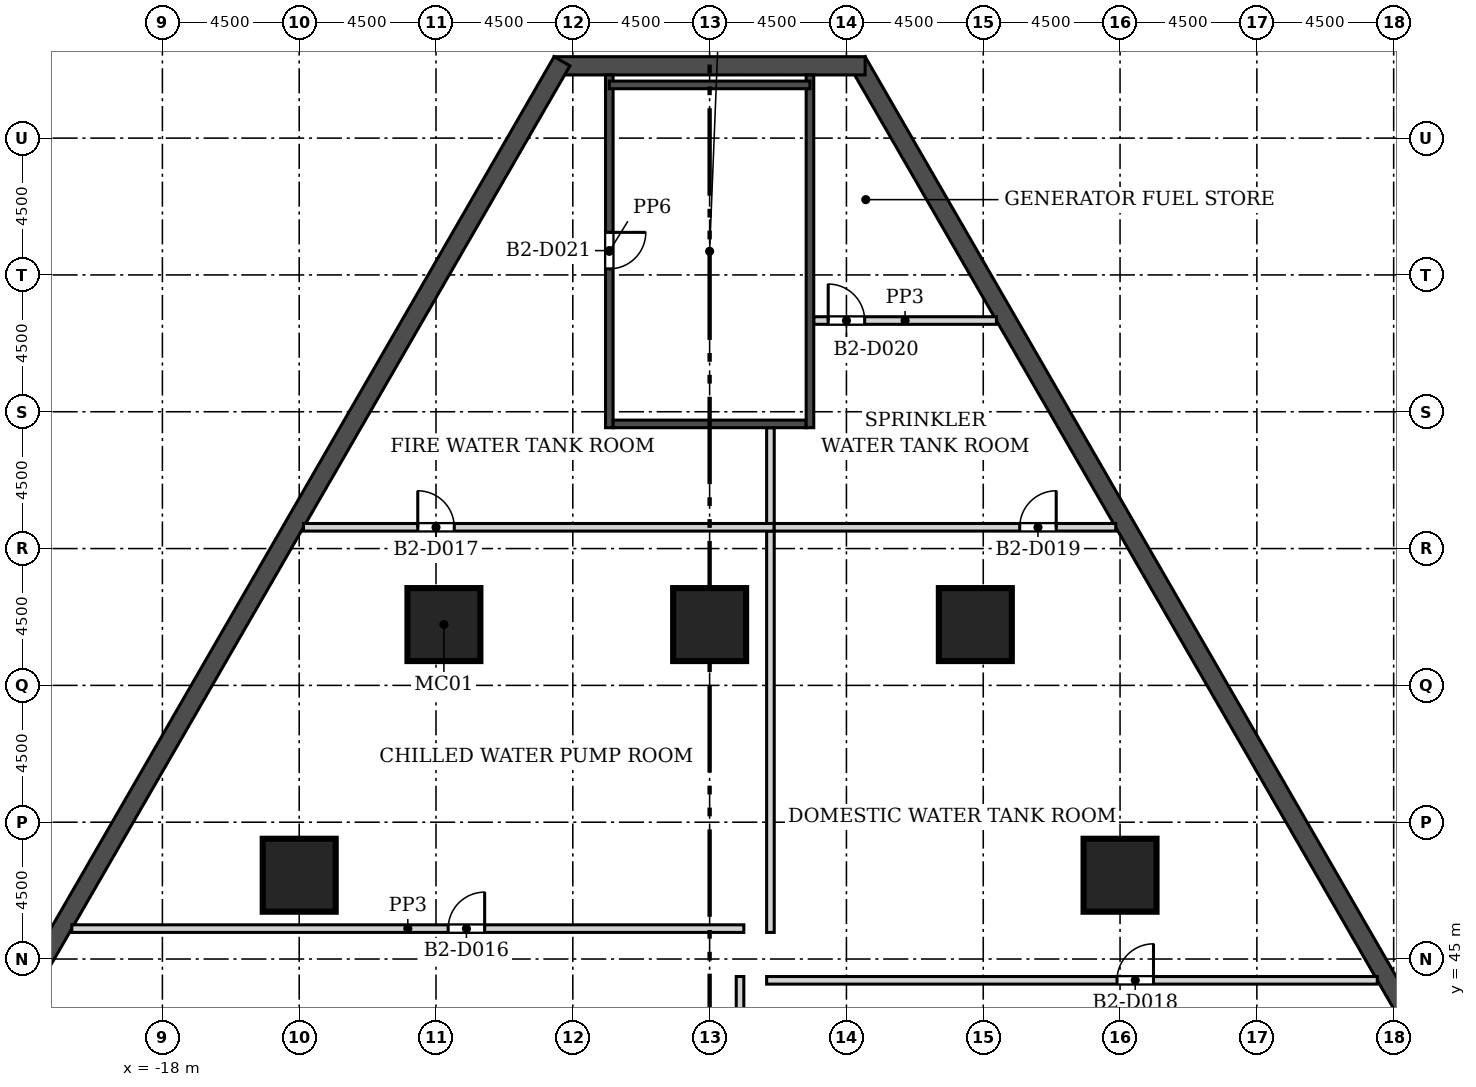
"""IFC4 building model, lengths in metres.
Left out: names, types, materials, properties, quantities, classifications, styles, units other than length and angle.
Written with IfcOpenShell. Run it as: python <this file> out.ifc"""

import sys

from ifc_helpers import new_model, si_unit, direction, frame, frame_2d, origin, origin_2d, place, context, subcontext, project, spatial, rectangle, extrude, element, fill, save


model = new_model("IFC4")
c1 = context("Model", 3, precision=1e-05, world=origin(), true_north=direction((0.0, 1.0)))
c2 = subcontext(c1, "Body", "Model", "MODEL_VIEW")
j1 = project(units=[si_unit("LENGTHUNIT", "METRE"), si_unit("PLANEANGLEUNIT", "RADIAN")], contexts=[c1])
p1 = place(None, origin())
s1 = spatial("IfcSite", under=j1, at=p1, CompositionType="ELEMENT")
p2 = place(p1, origin())
s2 = spatial("IfcBuilding", under=s1, at=p2, CompositionType="ELEMENT")
p3 = place(p2, frame((0.0, 0.0, -14.0)))
s3 = spatial("IfcBuildingStorey", under=s2, at=p3, CompositionType="ELEMENT", Elevation=-14.0)
p4 = place(p3, frame((42.971, 8.51, -0.4), z_axis=(0.0, 0.0, 1.0), x_axis=(-0.499999312333, 0.866025800809, 0.0)))
e1 = element("IfcWall", 1, at=p4, inside=s3, PredefinedType="SOLIDWALL", context=c2, shape_type="SweptSolid", body=[
    extrude(rectangle(XDim=76.231, YDim=0.6, at=frame_2d((38.115, 0.0))), origin(), (0.0, 0.0, 1.0), 6.4),
])
p5 = place(p3, frame((5.115, 74.378, -0.4), z_axis=(0.0, 0.0, 1.0), x_axis=(-1.0, 0.0, 0.0)))
e2 = element("IfcWall", 2, at=p5, inside=s3, PredefinedType="SOLIDWALL", context=c2, shape_type="SweptSolid", body=[
    extrude(rectangle(XDim=10.231, YDim=0.6, at=frame_2d((5.115, 0.0))), origin(), (0.0, 0.0, 1.0), 6.4),
])
p6 = place(p3, frame((-4.856, 74.528, -0.4), z_axis=(0.0, 0.0, 1.0), x_axis=(-0.499999312333, -0.866025800809, 0.0)))
e3 = element("IfcWall", 3, at=p6, inside=s3, PredefinedType="SOLIDWALL", context=c2, shape_type="SweptSolid", body=[
    extrude(rectangle(XDim=76.231, YDim=0.6, at=frame_2d((38.115, 0.0))), origin(), (0.0, 0.0, 1.0), 6.4),
])
for number, where, z_axis, x_axis in (
    (4, (-8.74, 56.0, 0.0), (0.0, 0.0, 1.0), (1.0, 0.0, 0.0)),
    (5, (8.74, 56.0, 0.0), (0.0, 0.0, 1.0), (1.0, 0.0, 0.0)),
    (6, (-13.5, 47.756, 0.0), (0.0, 0.0, 1.0), (1.0, 0.0, 0.0)),
    (7, (0.0, 56.0, 0.0), (0.0, 0.0, 1.0), (1.0, 0.0, 0.0)),
    (8, (13.5, 47.756, 0.0), (0.0, 0.0, 1.0), (1.0, 0.0, 0.0)),
):
    element("IfcColumn", number, at=place(p3, frame(where, z_axis=z_axis, x_axis=x_axis)), inside=s3, PredefinedType="COLUMN", context=c2, shape_type="SweptSolid", body=[
        extrude(rectangle(XDim=2.4, YDim=2.4, at=origin_2d()), origin(), (0.0, 0.0, 1.0), 6.0),
    ])
p7 = place(p3, frame((1.875, 44.3, 0.0), z_axis=(0.0, 0.0, 1.0), x_axis=(1.0, 0.0, 0.0)))
e9 = element("IfcWall", 9, at=p7, inside=s3, PredefinedType="SOLIDWALL", context=c2, shape_type="SweptSolid", body=[
    extrude(rectangle(XDim=20.086, YDim=0.25, at=frame_2d((10.043, 0.0))), origin(), (0.0, 0.0, 1.0), 5.65),
])
p8 = place(p7, frame((11.525, 0.0, 0.0)))
e10 = element("IfcOpeningElement", 10, at=p8, cuts=e9, PredefinedType="OPENING", context=c2, shape_type="SweptSolid", body=[
    extrude(rectangle(XDim=1.2, YDim=2.1, at=frame_2d((0.6, 1.05))), frame((0.0, 0.135, 0.0), z_axis=(0.0, -1.0, 0.0), x_axis=(1.0, 0.0, 0.0)), (0.0, 0.0, 1.0), 0.27),
])
p9 = place(p3, frame((1.0, 44.425, 0.0), z_axis=(0.0, 0.0, 1.0), x_axis=(0.0, -1.0, 0.0)))
e11 = element("IfcWall", 11, at=p9, inside=s3, PredefinedType="SOLIDWALL", context=c2, shape_type="SweptSolid", body=[
    extrude(rectangle(XDim=8.663, YDim=0.25, at=frame_2d((4.332, 0.0))), origin(), (0.0, 0.0, 1.0), 5.65),
])
p10 = place(p3, frame((-20.98, 46.0, 0.0), z_axis=(0.0, 0.0, 1.0), x_axis=(1.0, 0.0, 0.0)))
e12 = element("IfcWall", 12, at=p10, inside=s3, PredefinedType="SOLIDWALL", context=c2, shape_type="SweptSolid", body=[
    extrude(rectangle(XDim=22.105, YDim=0.25, at=frame_2d((11.052, 0.0))), origin(), (0.0, 0.0, 1.0), 5.65),
])
p11 = place(p10, frame((12.38, 0.0, 0.0)))
e13 = element("IfcOpeningElement", 13, at=p11, cuts=e12, PredefinedType="OPENING", context=c2, shape_type="SweptSolid", body=[
    extrude(rectangle(XDim=1.2, YDim=2.1, at=frame_2d((0.6, 1.05))), frame((0.0, 0.135, 0.0), z_axis=(0.0, -1.0, 0.0), x_axis=(1.0, 0.0, 0.0)), (0.0, 0.0, 1.0), 0.27),
])
p12 = place(p3, frame((2.0, 59.075, 0.0), z_axis=(0.0, 0.0, 1.0), x_axis=(0.0, -1.0, 0.0)))
e14 = element("IfcWall", 14, at=p12, inside=s3, PredefinedType="SOLIDWALL", context=c2, shape_type="SweptSolid", body=[
    extrude(rectangle(XDim=13.2, YDim=0.25, at=frame_2d((6.6, 0.0))), origin(), (0.0, 0.0, 1.0), 5.65),
])
p13 = place(p3, frame((-13.359, 59.2, 0.0), z_axis=(0.0, 0.0, 1.0), x_axis=(1.0, 0.0, 0.0)))
e15 = element("IfcWall", 15, at=p13, inside=s3, PredefinedType="SOLIDWALL", context=c2, shape_type="SweptSolid", body=[
    extrude(rectangle(XDim=15.484, YDim=0.25, at=frame_2d((7.742, 0.0))), origin(), (0.0, 0.0, 1.0), 5.65),
])
p14 = place(p13, frame((3.759, 0.0, 0.0)))
e16 = element("IfcOpeningElement", 16, at=p14, cuts=e15, PredefinedType="OPENING", context=c2, shape_type="SweptSolid", body=[
    extrude(rectangle(XDim=1.2, YDim=2.1, at=frame_2d((0.6, 1.05))), frame((0.0, 0.135, 0.0), z_axis=(0.0, -1.0, 0.0), x_axis=(1.0, 0.0, 0.0)), (0.0, 0.0, 1.0), 0.27),
])
p15 = place(p3, frame((2.125, 59.2, 0.0), z_axis=(0.0, 0.0, 1.0), x_axis=(1.0, 0.0, 0.0)))
e17 = element("IfcWall", 17, at=p15, inside=s3, PredefinedType="SOLIDWALL", context=c2, shape_type="SweptSolid", body=[
    extrude(rectangle(XDim=11.234, YDim=0.25, at=frame_2d((5.617, 0.0))), origin(), (0.0, 0.0, 1.0), 5.65),
])
p16 = place(p15, frame((8.075, 0.0, 0.0)))
e18 = element("IfcOpeningElement", 18, at=p16, cuts=e17, PredefinedType="OPENING", context=c2, shape_type="SweptSolid", body=[
    extrude(rectangle(XDim=1.2, YDim=2.1, at=frame_2d((0.6, 1.05))), frame((0.0, 0.135, 0.0), z_axis=(0.0, -1.0, 0.0), x_axis=(1.0, 0.0, 0.0)), (0.0, 0.0, 1.0), 0.27),
])
p17 = place(p3, frame((-3.3, 62.475, 0.0), z_axis=(0.0, 0.0, 1.0), x_axis=(0.0, 1.0, 0.0)))
e19 = element("IfcWall", 19, at=p17, inside=s3, PredefinedType="SOLIDWALL", context=c2, shape_type="SweptSolid", body=[
    extrude(rectangle(XDim=11.603, YDim=0.25, at=frame_2d((5.802, 0.0))), origin(), (0.0, 0.0, 1.0), 5.65),
])
p18 = place(p17, frame((5.225, 0.0, 0.0)))
e20 = element("IfcOpeningElement", 20, at=p18, cuts=e19, PredefinedType="OPENING", context=c2, shape_type="SweptSolid", body=[
    extrude(rectangle(XDim=1.2, YDim=2.1, at=frame_2d((0.6, 1.05))), frame((0.0, 0.135, 0.0), z_axis=(0.0, -1.0, 0.0), x_axis=(1.0, 0.0, 0.0)), (0.0, 0.0, 1.0), 0.27),
])
p19 = place(p3, frame((2.0, 62.475, 0.0), z_axis=(0.0, 0.0, 1.0), x_axis=(0.0, -1.0, 0.0)))
e21 = element("IfcWall", 21, at=p19, inside=s3, PredefinedType="SOLIDWALL", context=c2, shape_type="SweptSolid", body=[
    extrude(rectangle(XDim=3.15, YDim=0.25, at=frame_2d((1.575, 0.0))), origin(), (0.0, 0.0, 1.0), 5.65),
])
p20 = place(p3, frame((3.175, 62.6, 0.0), z_axis=(0.0, 0.0, 1.0), x_axis=(-1.0, 0.0, 0.0)))
e22 = element("IfcWall", 22, at=p20, inside=s3, PredefinedType="SOLIDWALL", context=c2, shape_type="SweptSolid", body=[
    extrude(rectangle(XDim=6.35, YDim=0.25, at=frame_2d((3.175, 0.0))), origin(), (0.0, 0.0, 1.0), 5.65),
])
p21 = place(p3, frame((3.425, 66.0, 0.0), z_axis=(0.0, 0.0, 1.0), x_axis=(1.0, 0.0, 0.0)))
e23 = element("IfcWall", 23, at=p21, inside=s3, PredefinedType="SOLIDWALL", context=c2, shape_type="SweptSolid", body=[
    extrude(rectangle(XDim=6.008, YDim=0.25, at=frame_2d((3.004, 0.0))), origin(), (0.0, 0.0, 1.0), 5.65),
])
p22 = place(p21, frame((0.475, 0.0, 0.0)))
e24 = element("IfcOpeningElement", 24, at=p22, cuts=e23, PredefinedType="OPENING", context=c2, shape_type="SweptSolid", body=[
    extrude(rectangle(XDim=1.2, YDim=2.1, at=frame_2d((0.6, 1.05))), frame((0.0, 0.135, 0.0), z_axis=(0.0, -1.0, 0.0), x_axis=(1.0, 0.0, 0.0)), (0.0, 0.0, 1.0), 0.27),
])
p23 = place(p3, frame((3.3, 74.078, 0.0), z_axis=(0.0, 0.0, 1.0), x_axis=(0.0, -1.0, 0.0)))
e25 = element("IfcWall", 25, at=p23, inside=s3, PredefinedType="SOLIDWALL", context=c2, shape_type="SweptSolid", body=[
    extrude(rectangle(XDim=11.603, YDim=0.25, at=frame_2d((5.802, 0.0))), origin(), (0.0, 0.0, 1.0), 5.65),
])
p24 = place(p3, frame((-3.3, 73.75, 0.0), z_axis=(0.0, 0.0, 1.0), x_axis=(1.0, 0.0, 0.0)))
e26 = element("IfcWall", 26, at=p24, inside=s3, PredefinedType="SOLIDWALL", context=c2, shape_type="SweptSolid", body=[
    extrude(rectangle(XDim=6.6, YDim=0.25, at=frame_2d((3.3, 0.0))), origin(), (0.0, 0.0, 1.0), 5.65),
])
p25 = place(p11, origin())
e27 = element("IfcDoor", 27, at=p25, inside=s3, OperationType="SINGLE_SWING_RIGHT", PredefinedType="DOOR", context=c2, shape_type="SweptSolid", body=[
    extrude(rectangle(XDim=1.2, YDim=2.1, at=frame_2d((0.6, 1.05))), frame((0.0, 0.025, 0.0), z_axis=(0.0, -1.0, 0.0), x_axis=(1.0, 0.0, 0.0)), (0.0, 0.0, 1.0), 0.05),
])
fill(e13, e27)
p26 = place(p14, origin())
e28 = element("IfcDoor", 28, at=p26, inside=s3, OperationType="SINGLE_SWING_LEFT", PredefinedType="DOOR", context=c2, shape_type="SweptSolid", body=[
    extrude(rectangle(XDim=1.2, YDim=2.1, at=frame_2d((0.6, 1.05))), frame((0.0, 0.025, 0.0), z_axis=(0.0, -1.0, 0.0), x_axis=(1.0, 0.0, 0.0)), (0.0, 0.0, 1.0), 0.05),
])
fill(e16, e28)
p27 = place(p8, origin())
e29 = element("IfcDoor", 29, at=p27, inside=s3, OperationType="SINGLE_SWING_RIGHT", PredefinedType="DOOR", context=c2, shape_type="SweptSolid", body=[
    extrude(rectangle(XDim=1.2, YDim=2.1, at=frame_2d((0.6, 1.05))), frame((0.0, 0.025, 0.0), z_axis=(0.0, -1.0, 0.0), x_axis=(1.0, 0.0, 0.0)), (0.0, 0.0, 1.0), 0.05),
])
fill(e10, e29)
p28 = place(p16, origin())
e30 = element("IfcDoor", 30, at=p28, inside=s3, OperationType="SINGLE_SWING_RIGHT", PredefinedType="DOOR", context=c2, shape_type="SweptSolid", body=[
    extrude(rectangle(XDim=1.2, YDim=2.1, at=frame_2d((0.6, 1.05))), frame((0.0, 0.025, 0.0), z_axis=(0.0, -1.0, 0.0), x_axis=(1.0, 0.0, 0.0)), (0.0, 0.0, 1.0), 0.05),
])
fill(e18, e30)
p29 = place(p22, origin())
e31 = element("IfcDoor", 31, at=p29, inside=s3, OperationType="SINGLE_SWING_LEFT", PredefinedType="DOOR", context=c2, shape_type="SweptSolid", body=[
    extrude(rectangle(XDim=1.2, YDim=2.1, at=frame_2d((0.6, 1.05))), frame((0.0, 0.025, 0.0), z_axis=(0.0, -1.0, 0.0), x_axis=(1.0, 0.0, 0.0)), (0.0, 0.0, 1.0), 0.05),
])
fill(e24, e31)
p30 = place(p18, frame((1.2, 0.0, 0.0), z_axis=(0.0, 0.0, 1.0), x_axis=(-1.0, 0.0, 0.0)))
e32 = element("IfcDoor", 32, at=p30, inside=s3, OperationType="SINGLE_SWING_LEFT", PredefinedType="DOOR", context=c2, shape_type="SweptSolid", body=[
    extrude(rectangle(XDim=1.2, YDim=2.1, at=frame_2d((0.6, 1.05))), frame((0.0, 0.025, 0.0), z_axis=(0.0, -1.0, 0.0), x_axis=(1.0, 0.0, 0.0)), (0.0, 0.0, 1.0), 0.05),
])
fill(e20, e32)
save(model, sys.argv[1])
